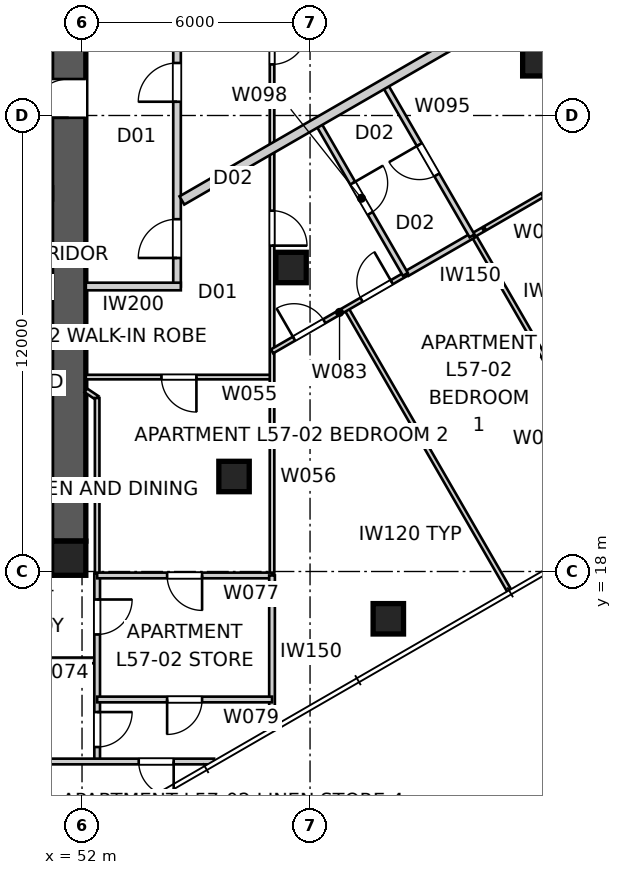
"""IFC4 building model, lengths in metres.
Left out: names, types, materials, properties, quantities, classifications, styles, units other than length and angle.
Written with IfcOpenShell. Run it as: python <this file> out.ifc"""

import sys

from ifc_helpers import new_model, si_unit, direction, frame, frame_2d, origin, origin_2d, place, context, subcontext, project, spatial, polyline, rectangle, outline, extrude, element, fill, save


model = new_model("IFC4")
c1 = context("Model", 3, precision=1e-05, world=origin(), true_north=direction((0.0, 1.0)))
c2 = subcontext(c1, "Body", "Model", "MODEL_VIEW")
j1 = project(units=[si_unit("LENGTHUNIT", "METRE"), si_unit("PLANEANGLEUNIT", "RADIAN")], contexts=[c1])
p1 = place(None, origin())
s1 = spatial("IfcSite", under=j1, at=p1, CompositionType="ELEMENT")
p2 = place(p1, origin())
s2 = spatial("IfcBuilding", under=s1, at=p2, CompositionType="ELEMENT")
p3 = place(p2, frame((0.0, 0.0, 208.2)))
s3 = spatial("IfcBuildingStorey", under=s2, at=p3, CompositionType="ELEMENT", Elevation=208.2)
p4 = place(p3, frame((51.2, 18.35, 0.0), z_axis=(0.0, 0.0, 1.0), x_axis=(-1.0, 0.0, 0.0)))
e1 = element("IfcWall", 1, at=p4, inside=s3, PredefinedType="SHEAR", context=c2, shape_type="SweptSolid", body=[
    extrude(outline(polyline([(0.0, -0.45), (22.4, -0.45), (22.4, -0.025), (22.85, -0.025), (22.85, 0.025), (22.4, 0.025), (22.4, 0.45), (0.0, 0.45), (0.0, 0.025), (-0.45, 0.025), (-0.45, -0.025), (0.0, -0.025), (0.0, -0.45)])), origin(), (0.0, 0.0, 1.0), 3.4),
])
p5 = place(p3, frame((51.65, 18.8, 0.0), z_axis=(0.0, 0.0, 1.0), x_axis=(0.0, 1.0, 0.0)))
e2 = element("IfcWall", 2, at=p5, inside=s3, PredefinedType="SHEAR", context=c2, shape_type="SweptSolid", body=[
    extrude(outline(polyline([(0.0, -0.45), (22.4, -0.45), (22.4, -0.025), (22.85, -0.025), (22.85, 0.025), (22.4, 0.025), (22.4, 0.45), (0.0, 0.45), (0.0, 0.025), (-0.45, 0.025), (-0.45, -0.025), (0.0, -0.025), (0.0, -0.45)])), origin(), (0.0, 0.0, 1.0), 3.4),
])
p6 = place(p5, frame((11.14, 0.0, 0.0)))
e3 = element("IfcOpeningElement", 3, at=p6, cuts=e2, PredefinedType="OPENING", context=c2, shape_type="SweptSolid", body=[
    extrude(rectangle(XDim=1.02, YDim=2.4, at=frame_2d((0.51, 1.2))), frame((0.0, 0.46, 0.0), z_axis=(0.0, -1.0, 0.0), x_axis=(1.0, 0.0, 0.0)), (0.0, 0.0, 1.0), 0.92),
])
p7 = place(p3, frame((51.65, 18.35, 0.0), z_axis=(0.0, 0.0, 1.0), x_axis=(1.0, 0.0, 0.0)))
e4 = element("IfcColumn", 4, at=p7, inside=s3, PredefinedType="COLUMN", context=c2, shape_type="SweptSolid", body=[
    extrude(rectangle(XDim=0.9, YDim=0.9, at=origin_2d()), origin(), (0.0, 0.0, 1.0), 3.4),
])
for number, where, z_axis, x_axis in (
    (5, (60.06, 16.755, -0.15), (0.0, 0.0, 1.0), (1.0, 0.0, 0.0)),
    (6, (63.995, 31.44, -0.15), (0.0, 0.0, 1.0), (1.0, 0.0, 0.0)),
):
    element("IfcColumn", number, at=place(p3, frame(where, z_axis=z_axis, x_axis=x_axis)), inside=s3, PredefinedType="COLUMN", context=c2, shape_type="SweptSolid", body=[
        extrude(rectangle(XDim=0.8, YDim=0.8, at=origin_2d()), origin(), (0.0, 0.0, 1.0), 3.55),
    ])
for number, where, z_axis, x_axis in (
    (7, (57.5, 26.0, 0.0), (0.0, 0.0, 1.0), (1.0, 0.0, 0.0)),
    (8, (56.0, 20.5, 0.0), (0.0, 0.0, 1.0), (1.0, 0.0, 0.0)),
):
    element("IfcColumn", number, at=place(p3, frame(where, z_axis=z_axis, x_axis=x_axis)), inside=s3, PredefinedType="COLUMN", context=c2, shape_type="SweptSolid", body=[
        extrude(rectangle(XDim=0.8, YDim=0.8, at=origin_2d()), origin(), (0.0, 0.0, 1.0), 3.4),
    ])
p8 = place(p3, frame((54.5, 25.5, 0.0), z_axis=(0.0, 0.0, 1.0), x_axis=(0.0, 1.0, 0.0)))
e9 = element("IfcWall", 9, at=p8, inside=s3, PredefinedType="PARTITIONING", context=c2, shape_type="SweptSolid", body=[
    extrude(rectangle(XDim=9.0, YDim=0.2, at=frame_2d((4.5, 0.0))), origin(), (0.0, 0.0, 1.0), 3.25),
])
p9 = place(p8, frame((4.862, 0.0, 0.0)))
e10 = element("IfcOpeningElement", 10, at=p9, cuts=e9, PredefinedType="OPENING", context=c2, shape_type="SweptSolid", body=[
    extrude(rectangle(XDim=1.02, YDim=2.34, at=frame_2d((0.51, 1.17))), frame((0.0, 0.11, 0.0), z_axis=(0.0, -1.0, 0.0), x_axis=(1.0, 0.0, 0.0)), (0.0, 0.0, 1.0), 0.22),
])
p10 = place(p8, frame((0.751, 0.0, 0.0)))
e11 = element("IfcOpeningElement", 11, at=p10, cuts=e9, PredefinedType="OPENING", context=c2, shape_type="SweptSolid", body=[
    extrude(rectangle(XDim=1.02, YDim=2.34, at=frame_2d((0.51, 1.17))), frame((0.0, 0.11, 0.0), z_axis=(0.0, -1.0, 0.0), x_axis=(1.0, 0.0, 0.0)), (0.0, 0.0, 1.0), 0.22),
])
p11 = place(p3, frame((52.1, 25.5, 0.0), z_axis=(0.0, 0.0, 1.0), x_axis=(1.0, 0.0, 0.0)))
e12 = element("IfcWall", 12, at=p11, inside=s3, PredefinedType="PARTITIONING", context=c2, shape_type="SweptSolid", body=[
    extrude(rectangle(XDim=2.5, YDim=0.2, at=frame_2d((1.25, 0.0))), origin(), (0.0, 0.0, 1.0), 3.25),
])
p12 = place(p3, frame((64.111, 33.239, 0.0), z_axis=(0.0, 0.0, 1.0), x_axis=(-0.866024069551, -0.500002310952, 0.0)))
e13 = element("IfcWall", 13, at=p12, inside=s3, PredefinedType="PARTITIONING", context=c2, shape_type="SweptSolid", body=[
    extrude(rectangle(XDim=10.95, YDim=0.25, at=frame_2d((5.475, 0.0))), origin(), (0.0, 0.0, 1.0), 3.25),
])
p13 = place(p3, frame((57.0, 23.116, 0.0), z_axis=(0.0, 0.0, 1.0), x_axis=(-1.0, 0.0, 0.0)))
e14 = element("IfcWall", 14, at=p13, inside=s3, PredefinedType="PARTITIONING", context=c2, shape_type="SweptSolid", body=[
    extrude(rectangle(XDim=4.9, YDim=0.12, at=frame_2d((2.45, 0.0))), origin(), (0.0, 0.0, 1.0), 3.25),
])
p14 = place(p13, frame((1.99, 0.0, 0.0)))
e15 = element("IfcOpeningElement", 15, at=p14, cuts=e14, PredefinedType="OPENING", context=c2, shape_type="SweptSolid", body=[
    extrude(rectangle(XDim=0.92, YDim=2.34, at=frame_2d((0.46, 1.17))), frame((0.0, 0.07, 0.0), z_axis=(0.0, -1.0, 0.0), x_axis=(1.0, 0.0, 0.0)), (0.0, 0.0, 1.0), 0.14),
])
p15 = place(p3, frame((57.0, 39.815, 0.0), z_axis=(0.0, 0.0, 1.0), x_axis=(0.0, -1.0, 0.0)))
e16 = element("IfcWall", 16, at=p15, inside=s3, PredefinedType="PARTITIONING", context=c2, shape_type="SweptSolid", body=[
    extrude(rectangle(XDim=21.919, YDim=0.12, at=frame_2d((10.959, 0.0))), origin(), (0.0, 0.0, 1.0), 2.55),
])
p16 = place(p15, frame((7.551, 0.0, 0.0)))
e17 = element("IfcOpeningElement", 17, at=p16, cuts=e16, PredefinedType="OPENING", context=c2, shape_type="SweptSolid", body=[
    extrude(rectangle(XDim=0.92, YDim=2.34, at=frame_2d((0.46, 1.17))), frame((0.0, 0.07, 0.0), z_axis=(0.0, -1.0, 0.0), x_axis=(1.0, 0.0, 0.0)), (0.0, 0.0, 1.0), 0.14),
])
p17 = place(p15, frame((12.32, 0.0, 0.0)))
e18 = element("IfcOpeningElement", 18, at=p17, cuts=e16, PredefinedType="OPENING", context=c2, shape_type="SweptSolid", body=[
    extrude(rectangle(XDim=0.92, YDim=2.34, at=frame_2d((0.46, 1.17))), frame((0.0, 0.07, 0.0), z_axis=(0.0, -1.0, 0.0), x_axis=(1.0, 0.0, 0.0)), (0.0, 0.0, 1.0), 0.14),
])
p18 = place(p3, frame((52.398, 15.66, 0.0), z_axis=(0.0, 0.0, 1.0), x_axis=(-1.0, 0.0, 0.0)))
e19 = element("IfcWall", 19, at=p18, inside=s3, PredefinedType="SOLIDWALL", context=c2, shape_type="SweptSolid", body=[
    extrude(rectangle(XDim=6.378, YDim=0.15, at=frame_2d((3.189, 0.0))), origin(), (0.0, 0.0, 1.0), 3.25),
])
p19 = place(p3, frame((52.1, 22.766, 0.0), z_axis=(0.0, 0.0, 1.0), x_axis=(0.830477359488, -0.55705238118, 0.0)))
e20 = element("IfcWall", 20, at=p19, inside=s3, PredefinedType="PARTITIONING", context=c2, shape_type="SweptSolid", body=[
    extrude(rectangle(XDim=0.359, YDim=0.12, at=frame_2d((0.179, 0.0))), origin(), (0.0, 0.0, 1.0), 3.25),
])
p20 = place(p3, frame((52.398, 22.566, 0.0), z_axis=(0.0, 0.0, 1.0), x_axis=(0.0, -1.0, 0.0)))
e21 = element("IfcWall", 21, at=p20, inside=s3, PredefinedType="PARTITIONING", context=c2, shape_type="SweptSolid", body=[
    extrude(rectangle(XDim=4.621, YDim=0.12, at=frame_2d((2.31, 0.0))), origin(), (0.0, 0.0, 1.0), 3.25),
])
p21 = place(p3, frame((52.398, 17.946, 0.0), z_axis=(0.0, 0.0, 1.0), x_axis=(0.0, -1.0, 0.0)))
e22 = element("IfcWall", 22, at=p21, inside=s3, PredefinedType="SOLIDWALL", context=c2, shape_type="SweptSolid", body=[
    extrude(rectangle(XDim=4.946, YDim=0.15, at=frame_2d((2.473, 0.0))), origin(), (0.0, 0.0, 1.0), 3.25),
])
p22 = place(p21, frame((0.683, 0.0, 0.0)))
e23 = element("IfcOpeningElement", 23, at=p22, cuts=e22, PredefinedType="OPENING", context=c2, shape_type="SweptSolid", body=[
    extrude(rectangle(XDim=0.92, YDim=2.1, at=frame_2d((0.46, 1.05))), frame((0.0, 0.085, 0.0), z_axis=(0.0, -1.0, 0.0), x_axis=(1.0, 0.0, 0.0)), (0.0, 0.0, 1.0), 0.17),
])
p23 = place(p21, frame((3.645, 0.0, 0.0)))
e24 = element("IfcOpeningElement", 24, at=p23, cuts=e22, PredefinedType="OPENING", context=c2, shape_type="SweptSolid", body=[
    extrude(rectangle(XDim=0.92, YDim=2.34, at=frame_2d((0.46, 1.17))), frame((0.0, 0.085, 0.0), z_axis=(0.0, -1.0, 0.0), x_axis=(1.0, 0.0, 0.0)), (0.0, 0.0, 1.0), 0.17),
])
p24 = place(p3, frame((55.475, 13.0, 0.0), z_axis=(0.0, 0.0, 1.0), x_axis=(-1.0, 0.0, 0.0)))
e25 = element("IfcWall", 25, at=p24, inside=s3, PredefinedType="SOLIDWALL", context=c2, shape_type="SweptSolid", body=[
    extrude(rectangle(XDim=8.892, YDim=0.15, at=frame_2d((4.446, 0.0))), origin(), (0.0, 0.0, 1.0), 3.25),
])
p25 = place(p24, frame((1.063, 0.0, 0.0)))
e26 = element("IfcOpeningElement", 26, at=p25, cuts=e25, PredefinedType="OPENING", context=c2, shape_type="SweptSolid", body=[
    extrude(rectangle(XDim=0.92, YDim=2.1, at=frame_2d((0.46, 1.05))), frame((0.0, 0.085, 0.0), z_axis=(0.0, -1.0, 0.0), x_axis=(1.0, 0.0, 0.0)), (0.0, 0.0, 1.0), 0.17),
])
p26 = place(p3, frame((57.0, 17.896, 0.0), z_axis=(0.0, 0.0, 1.0), x_axis=(-1.0, 0.0, 0.0)))
e27 = element("IfcWall", 27, at=p26, inside=s3, PredefinedType="SOLIDWALL", context=c2, shape_type="SweptSolid", body=[
    extrude(rectangle(XDim=4.602, YDim=0.15, at=frame_2d((2.301, 0.0))), origin(), (0.0, 0.0, 1.0), 3.25),
])
p27 = place(p26, frame((1.841, 0.0, 0.0)))
e28 = element("IfcOpeningElement", 28, at=p27, cuts=e27, PredefinedType="OPENING", context=c2, shape_type="SweptSolid", body=[
    extrude(rectangle(XDim=0.92, YDim=2.34, at=frame_2d((0.46, 1.17))), frame((0.0, 0.085, 0.0), z_axis=(0.0, -1.0, 0.0), x_axis=(1.0, 0.0, 0.0)), (0.0, 0.0, 1.0), 0.17),
])
p28 = place(p3, frame((57.0, 17.896, 0.0), z_axis=(0.0, 0.0, 1.0), x_axis=(-0.00012159533, -0.999999992607, 0.0)))
e29 = element("IfcWall", 29, at=p28, inside=s3, PredefinedType="SOLIDWALL", context=c2, shape_type="SweptSolid", body=[
    extrude(rectangle(XDim=4.016, YDim=0.15, at=frame_2d((2.008, 0.0))), origin(), (0.0, 0.0, 1.0), 3.25),
])
p29 = place(p3, frame((57.0, 14.632, 0.0), z_axis=(0.0, 0.0, 1.0), x_axis=(-1.0, 0.0, 0.0)))
e30 = element("IfcWall", 30, at=p29, inside=s3, PredefinedType="SOLIDWALL", context=c2, shape_type="SweptSolid", body=[
    extrude(rectangle(XDim=4.602, YDim=0.15, at=frame_2d((2.301, 0.0))), origin(), (0.0, 0.0, 1.0), 3.25),
])
p30 = place(p29, frame((1.841, 0.0, 0.0)))
e31 = element("IfcOpeningElement", 31, at=p30, cuts=e30, PredefinedType="OPENING", context=c2, shape_type="SweptSolid", body=[
    extrude(rectangle(XDim=0.92, YDim=2.34, at=frame_2d((0.46, 1.17))), frame((0.0, 0.085, 0.0), z_axis=(0.0, -1.0, 0.0), x_axis=(1.0, 0.0, 0.0)), (0.0, 0.0, 1.0), 0.17),
])
p31 = place(p3, frame((63.246, 17.487, 0.0), z_axis=(0.0, 0.0, 1.0), x_axis=(-0.49999898161, 0.866025991751, 0.0)))
e32 = element("IfcWall", 32, at=p31, inside=s3, PredefinedType="PARTITIONING", context=c2, shape_type="SweptSolid", body=[
    extrude(rectangle(XDim=8.585, YDim=0.12, at=frame_2d((4.292, 0.0))), origin(), (0.0, 0.0, 1.0), 3.25),
])
p32 = place(p3, frame((57.0, 23.793, 0.0), z_axis=(0.0, 0.0, 1.0), x_axis=(0.866007146345, 0.50003162148, 0.0)))
e33 = element("IfcWall", 33, at=p32, inside=s3, PredefinedType="PARTITIONING", context=c2, shape_type="SweptSolid", body=[
    extrude(rectangle(XDim=4.101, YDim=0.12, at=frame_2d((2.051, 0.0))), origin(), (0.0, 0.0, 1.0), 3.25),
])
p33 = place(p32, frame((0.668, 0.0, 0.0)))
e34 = element("IfcOpeningElement", 34, at=p33, cuts=e33, PredefinedType="OPENING", context=c2, shape_type="SweptSolid", body=[
    extrude(rectangle(XDim=0.92, YDim=2.34, at=frame_2d((0.46, 1.17))), frame((0.0, 0.07, 0.0), z_axis=(0.0, -1.0, 0.0), x_axis=(1.0, 0.0, 0.0)), (0.0, 0.0, 1.0), 0.14),
])
p34 = place(p32, frame((2.719, 0.0, 0.0)))
e35 = element("IfcOpeningElement", 35, at=p34, cuts=e33, PredefinedType="OPENING", context=c2, shape_type="SweptSolid", body=[
    extrude(rectangle(XDim=0.92, YDim=2.34, at=frame_2d((0.46, 1.17))), frame((0.0, 0.07, 0.0), z_axis=(0.0, -1.0, 0.0), x_axis=(1.0, 0.0, 0.0)), (0.0, 0.0, 1.0), 0.14),
])
p35 = place(p3, frame((62.299, 26.853, 0.0), z_axis=(0.0, 0.0, 1.0), x_axis=(0.500006955494, -0.866021387991, 0.0)))
e36 = element("IfcWall", 36, at=p35, inside=s3, PredefinedType="PARTITIONING", context=c2, shape_type="SweptSolid", body=[
    extrude(rectangle(XDim=4.705, YDim=0.12, at=frame_2d((2.352, 0.0))), origin(), (0.0, 0.0, 1.0), 3.25),
])
p36 = place(p3, frame((60.552, 25.844, 0.0), z_axis=(0.0, 0.0, 1.0), x_axis=(0.866074730264, 0.499914554297, 0.0)))
e37 = element("IfcWall", 37, at=p36, inside=s3, PredefinedType="SOLIDWALL", context=c2, shape_type="SweptSolid", body=[
    extrude(rectangle(XDim=2.017, YDim=0.15, at=frame_2d((1.008, 0.0))), origin(), (0.0, 0.0, 1.0), 3.25),
])
p37 = place(p3, frame((62.555, 27.0, 0.0), z_axis=(0.0, 0.0, 1.0), x_axis=(-0.865896854829, -0.500222587251, 0.0)))
e38 = element("IfcWall", 38, at=p37, inside=s3, PredefinedType="PARTITIONING", context=c2, shape_type="SweptSolid", body=[
    extrude(rectangle(XDim=0.296, YDim=0.12, at=frame_2d((0.148, 0.0))), origin(), (0.0, 0.0, 1.0), 3.25),
])
p38 = place(p3, frame((66.388, 29.214, 0.0), z_axis=(0.0, 0.0, 1.0), x_axis=(-0.866032173762, -0.499988273872, 0.0)))
e39 = element("IfcWall", 39, at=p38, inside=s3, PredefinedType="PARTITIONING", context=c2, shape_type="SweptSolid", body=[
    extrude(rectangle(XDim=4.373, YDim=0.12, at=frame_2d((2.186, 0.0))), origin(), (0.0, 0.0, 1.0), 3.25),
])
p39 = place(p38, frame((1.706, 0.0, 0.0)))
e40 = element("IfcOpeningElement", 40, at=p39, cuts=e39, PredefinedType="OPENING", context=c2, shape_type="SweptSolid", body=[
    extrude(rectangle(XDim=0.92, YDim=2.34, at=frame_2d((0.46, 1.17))), frame((0.0, 0.07, 0.0), z_axis=(0.0, -1.0, 0.0), x_axis=(1.0, 0.0, 0.0)), (0.0, 0.0, 1.0), 0.14),
])
p40 = place(p3, frame((62.263, 26.832, 0.0), z_axis=(0.0, 0.0, 1.0), x_axis=(-0.499999662836, 0.866025598446, 0.0)))
e41 = element("IfcWall", 41, at=p40, inside=s3, PredefinedType="SOLIDWALL", context=c2, shape_type="SweptSolid", body=[
    extrude(rectangle(XDim=4.625, YDim=0.15, at=frame_2d((2.312, 0.0))), origin(), (0.0, 0.0, 1.0), 3.25),
])
p41 = place(p40, frame((1.853, 0.0, 0.0)))
e42 = element("IfcOpeningElement", 42, at=p41, cuts=e41, PredefinedType="OPENING", context=c2, shape_type="SweptSolid", body=[
    extrude(rectangle(XDim=0.92, YDim=2.34, at=frame_2d((0.46, 1.17))), frame((0.0, 0.085, 0.0), z_axis=(0.0, -1.0, 0.0), x_axis=(1.0, 0.0, 0.0)), (0.0, 0.0, 1.0), 0.17),
])
p42 = place(p3, frame((58.196, 29.824, 0.0), z_axis=(0.0, 0.0, 1.0), x_axis=(0.499999662836, -0.866025598446, 0.0)))
e43 = element("IfcWall", 43, at=p42, inside=s3, PredefinedType="SOLIDWALL", context=c2, shape_type="SweptSolid", body=[
    extrude(rectangle(XDim=4.625, YDim=0.15, at=frame_2d((2.312, 0.0))), origin(), (0.0, 0.0, 1.0), 3.25),
])
p43 = place(p42, frame((1.853, 0.0, 0.0)))
e44 = element("IfcOpeningElement", 44, at=p43, cuts=e43, PredefinedType="OPENING", context=c2, shape_type="SweptSolid", body=[
    extrude(rectangle(XDim=0.92, YDim=2.34, at=frame_2d((0.46, 1.17))), frame((0.0, 0.085, 0.0), z_axis=(0.0, -1.0, 0.0), x_axis=(1.0, 0.0, 0.0)), (0.0, 0.0, 1.0), 0.17),
])
p44 = place(p9, origin())
e45 = element("IfcDoor", 45, at=p44, inside=s3, OperationType="SINGLE_SWING_LEFT", PredefinedType="DOOR", context=c2, shape_type="SweptSolid", body=[
    extrude(rectangle(XDim=1.02, YDim=2.34, at=frame_2d((0.51, 1.17))), frame((0.0, 0.025, 0.0), z_axis=(0.0, -1.0, 0.0), x_axis=(1.0, 0.0, 0.0)), (0.0, 0.0, 1.0), 0.05),
])
fill(e10, e45)
p45 = place(p10, origin())
e46 = element("IfcDoor", 46, at=p45, inside=s3, OperationType="SINGLE_SWING_LEFT", PredefinedType="DOOR", context=c2, shape_type="SweptSolid", body=[
    extrude(rectangle(XDim=1.02, YDim=2.34, at=frame_2d((0.51, 1.17))), frame((0.0, 0.025, 0.0), z_axis=(0.0, -1.0, 0.0), x_axis=(1.0, 0.0, 0.0)), (0.0, 0.0, 1.0), 0.05),
])
fill(e11, e46)
p46 = place(p16, origin())
e47 = element("IfcDoor", 47, at=p46, inside=s3, OperationType="SINGLE_SWING_LEFT", PredefinedType="DOOR", context=c2, shape_type="SweptSolid", body=[
    extrude(rectangle(XDim=0.92, YDim=2.34, at=frame_2d((0.46, 1.17))), frame((0.0, 0.025, 0.0), z_axis=(0.0, -1.0, 0.0), x_axis=(1.0, 0.0, 0.0)), (0.0, 0.0, 1.0), 0.05),
])
fill(e17, e47)
p47 = place(p17, origin())
e48 = element("IfcDoor", 48, at=p47, inside=s3, OperationType="SINGLE_SWING_RIGHT", PredefinedType="DOOR", context=c2, shape_type="SweptSolid", body=[
    extrude(rectangle(XDim=0.92, YDim=2.34, at=frame_2d((0.46, 1.17))), frame((0.0, 0.025, 0.0), z_axis=(0.0, -1.0, 0.0), x_axis=(1.0, 0.0, 0.0)), (0.0, 0.0, 1.0), 0.05),
])
fill(e18, e48)
p48 = place(p14, origin())
e49 = element("IfcDoor", 49, at=p48, inside=s3, OperationType="SINGLE_SWING_LEFT", PredefinedType="DOOR", context=c2, shape_type="SweptSolid", body=[
    extrude(rectangle(XDim=0.92, YDim=2.34, at=frame_2d((0.46, 1.17))), frame((0.0, 0.025, 0.0), z_axis=(0.0, -1.0, 0.0), x_axis=(1.0, 0.0, 0.0)), (0.0, 0.0, 1.0), 0.05),
])
fill(e15, e49)
p49 = place(p43, origin())
e50 = element("IfcDoor", 50, at=p49, inside=s3, OperationType="SINGLE_SWING_LEFT", PredefinedType="DOOR", context=c2, shape_type="SweptSolid", body=[
    extrude(rectangle(XDim=0.92, YDim=2.34, at=frame_2d((0.46, 1.17))), frame((0.0, 0.025, 0.0), z_axis=(0.0, -1.0, 0.0), x_axis=(1.0, 0.0, 0.0)), (0.0, 0.0, 1.0), 0.05),
])
fill(e44, e50)
p50 = place(p33, origin())
e51 = element("IfcDoor", 51, at=p50, inside=s3, OperationType="SINGLE_SWING_LEFT", PredefinedType="DOOR", context=c2, shape_type="SweptSolid", body=[
    extrude(rectangle(XDim=0.92, YDim=2.34, at=frame_2d((0.46, 1.17))), frame((0.0, 0.025, 0.0), z_axis=(0.0, -1.0, 0.0), x_axis=(1.0, 0.0, 0.0)), (0.0, 0.0, 1.0), 0.05),
])
fill(e34, e51)
p51 = place(p34, origin())
e52 = element("IfcDoor", 52, at=p51, inside=s3, OperationType="SINGLE_SWING_RIGHT", PredefinedType="DOOR", context=c2, shape_type="SweptSolid", body=[
    extrude(rectangle(XDim=0.92, YDim=2.34, at=frame_2d((0.46, 1.17))), frame((0.0, 0.025, 0.0), z_axis=(0.0, -1.0, 0.0), x_axis=(1.0, 0.0, 0.0)), (0.0, 0.0, 1.0), 0.05),
])
fill(e35, e52)
p52 = place(p27, origin())
e53 = element("IfcDoor", 53, at=p52, inside=s3, OperationType="SINGLE_SWING_LEFT", PredefinedType="DOOR", context=c2, shape_type="SweptSolid", body=[
    extrude(rectangle(XDim=0.92, YDim=2.34, at=frame_2d((0.46, 1.17))), frame((0.0, 0.025, 0.0), z_axis=(0.0, -1.0, 0.0), x_axis=(1.0, 0.0, 0.0)), (0.0, 0.0, 1.0), 0.05),
])
fill(e28, e53)
p53 = place(p41, origin())
e54 = element("IfcDoor", 54, at=p53, inside=s3, OperationType="SINGLE_SWING_RIGHT", PredefinedType="DOOR", context=c2, shape_type="SweptSolid", body=[
    extrude(rectangle(XDim=0.92, YDim=2.34, at=frame_2d((0.46, 1.17))), frame((0.0, 0.025, 0.0), z_axis=(0.0, -1.0, 0.0), x_axis=(1.0, 0.0, 0.0)), (0.0, 0.0, 1.0), 0.05),
])
fill(e42, e54)
p54 = place(p30, origin())
e55 = element("IfcDoor", 55, at=p54, inside=s3, OperationType="SINGLE_SWING_RIGHT", PredefinedType="DOOR", context=c2, shape_type="SweptSolid", body=[
    extrude(rectangle(XDim=0.92, YDim=2.34, at=frame_2d((0.46, 1.17))), frame((0.0, 0.025, 0.0), z_axis=(0.0, -1.0, 0.0), x_axis=(1.0, 0.0, 0.0)), (0.0, 0.0, 1.0), 0.05),
])
fill(e31, e55)
p55 = place(p22, origin())
e56 = element("IfcDoor", 56, at=p55, inside=s3, OperationType="SINGLE_SWING_LEFT", PredefinedType="DOOR", context=c2, shape_type="SweptSolid", body=[
    extrude(rectangle(XDim=0.92, YDim=2.1, at=frame_2d((0.46, 1.05))), frame((0.0, 0.025, 0.0), z_axis=(0.0, -1.0, 0.0), x_axis=(1.0, 0.0, 0.0)), (0.0, 0.0, 1.0), 0.05),
])
fill(e23, e56)
p56 = place(p39, origin())
e57 = element("IfcDoor", 57, at=p56, inside=s3, OperationType="SINGLE_SWING_RIGHT", PredefinedType="DOOR", context=c2, shape_type="SweptSolid", body=[
    extrude(rectangle(XDim=0.92, YDim=2.34, at=frame_2d((0.46, 1.17))), frame((0.0, 0.025, 0.0), z_axis=(0.0, -1.0, 0.0), x_axis=(1.0, 0.0, 0.0)), (0.0, 0.0, 1.0), 0.05),
])
fill(e40, e57)
p57 = place(p25, origin())
e58 = element("IfcDoor", 58, at=p57, inside=s3, OperationType="SINGLE_SWING_LEFT", PredefinedType="DOOR", context=c2, shape_type="SweptSolid", body=[
    extrude(rectangle(XDim=0.92, YDim=2.1, at=frame_2d((0.46, 1.05))), frame((0.0, 0.025, 0.0), z_axis=(0.0, -1.0, 0.0), x_axis=(1.0, 0.0, 0.0)), (0.0, 0.0, 1.0), 0.05),
])
fill(e26, e58)
p58 = place(p23, origin())
e59 = element("IfcDoor", 59, at=p58, inside=s3, OperationType="SINGLE_SWING_LEFT", PredefinedType="DOOR", context=c2, shape_type="SweptSolid", body=[
    extrude(rectangle(XDim=0.92, YDim=2.34, at=frame_2d((0.46, 1.17))), frame((0.0, 0.025, 0.0), z_axis=(0.0, -1.0, 0.0), x_axis=(1.0, 0.0, 0.0)), (0.0, 0.0, 1.0), 0.05),
])
fill(e24, e59)
p59 = place(p6, origin())
e60 = element("IfcDoor", 60, at=p59, inside=s3, OperationType="SINGLE_SWING_LEFT", PredefinedType="DOOR", context=c2, shape_type="SweptSolid", body=[
    extrude(rectangle(XDim=1.02, YDim=2.4, at=frame_2d((0.51, 1.2))), frame((0.0, 0.025, 0.0), z_axis=(0.0, -1.0, 0.0), x_axis=(1.0, 0.0, 0.0)), (0.0, 0.0, 1.0), 0.05),
])
fill(e3, e60)
save(model, sys.argv[1])
